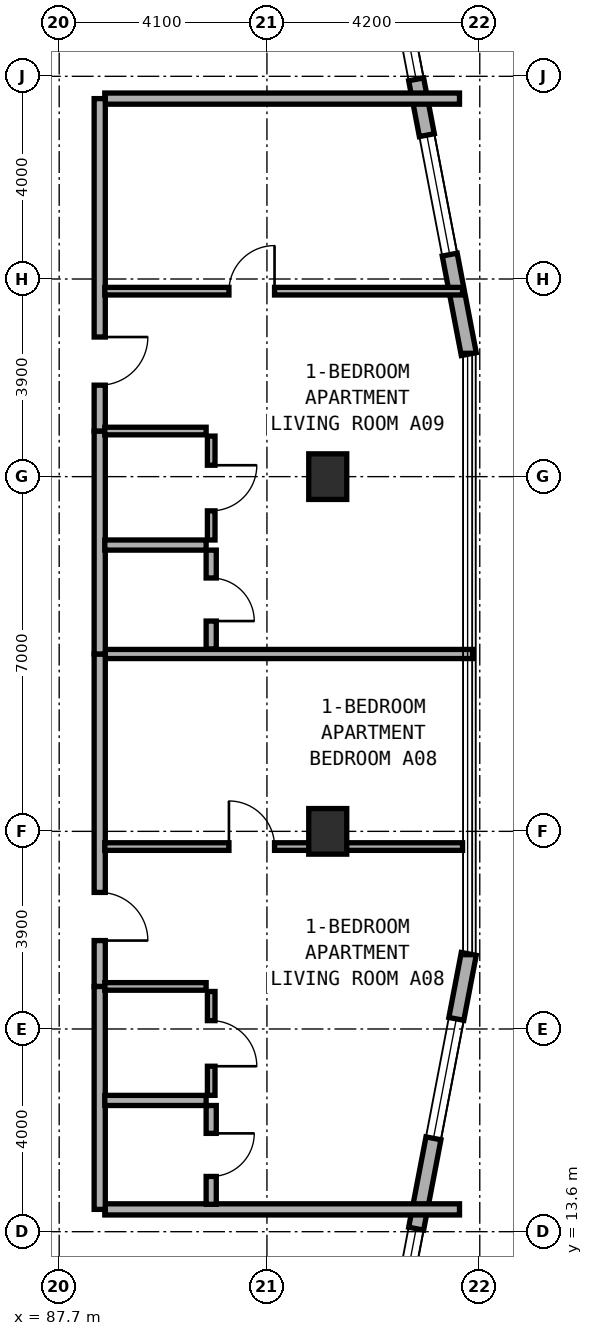
"""IFC4 building model, lengths in metres.
Left out: names, types, materials, properties, quantities, classifications, styles, units other than length and angle.
Written with IfcOpenShell. Run it as: python <this file> out.ifc"""

import sys

from ifc_helpers import new_model, si_unit, direction, frame, frame_2d, origin, origin_2d, place, context, subcontext, project, spatial, rectangle, extrude, element, fill, save


model = new_model("IFC4")
c1 = context("Model", 3, precision=1e-05, world=origin(), true_north=direction((0.0, 1.0)))
c2 = subcontext(c1, "Body", "Model", "MODEL_VIEW")
j1 = project(units=[si_unit("LENGTHUNIT", "METRE"), si_unit("PLANEANGLEUNIT", "RADIAN")], contexts=[c1])
p1 = place(None, origin())
s1 = spatial("IfcSite", under=j1, at=p1, CompositionType="ELEMENT")
p2 = place(p1, origin())
s2 = spatial("IfcBuilding", under=s1, at=p2, CompositionType="ELEMENT")
p3 = place(p2, frame((0.0, 0.0, 31.0)))
s3 = spatial("IfcBuildingStorey", under=s2, at=p3, CompositionType="ELEMENT", Elevation=31.0)
for number, where, z_axis, x_axis in (
    (1, (93.0, 21.5, 0.0), (0.0, 0.0, 1.0), (1.0, 0.0, 0.0)),
    (2, (93.0, 28.5, 0.0), (0.0, 0.0, 1.0), (1.0, 0.0, 0.0)),
):
    element("IfcColumn", number, at=place(p3, frame(where, z_axis=z_axis, x_axis=x_axis)), inside=s3, PredefinedType="COLUMN", context=c2, shape_type="SweptSolid", body=[
        extrude(rectangle(XDim=0.75, YDim=0.9, at=origin_2d()), origin(), (0.0, 0.0, 1.0), 3.5),
    ])
p4 = place(p3, frame((93.971, 9.62, 0.0), z_axis=(0.0, 0.0, 1.0), x_axis=(0.188087874316, 0.982152203854, 0.0)))
e3 = element("IfcWall", 3, at=p4, inside=s3, PredefinedType="STANDARD", context=c2, shape_type="SweptSolid", body=[
    extrude(rectangle(XDim=9.634, YDim=0.3, at=frame_2d((4.817, 0.0))), origin(), (0.0, 0.0, 1.0), 3.25),
])
p5 = place(p4, frame((0.452, 0.0, 0.85)))
e4 = element("IfcOpeningElement", 4, at=p5, cuts=e3, PredefinedType="OPENING", context=c2, shape_type="SweptSolid", body=[
    extrude(rectangle(XDim=1.5, YDim=1.5, at=frame_2d((0.75, 0.75))), frame((0.0, 0.16, 0.0), z_axis=(0.0, -1.0, 0.0), x_axis=(1.0, 0.0, 0.0)), (0.0, 0.0, 1.0), 0.32),
])
p6 = place(p4, frame((2.913, 0.0, 0.85)))
e5 = element("IfcOpeningElement", 5, at=p6, cuts=e3, PredefinedType="OPENING", context=c2, shape_type="SweptSolid", body=[
    extrude(rectangle(XDim=1.2, YDim=1.5, at=frame_2d((0.6, 0.75))), frame((0.0, 0.16, 0.0), z_axis=(0.0, -1.0, 0.0), x_axis=(1.0, 0.0, 0.0)), (0.0, 0.0, 1.0), 0.32),
])
p7 = place(p4, frame((5.928, 0.0, 0.8)))
e6 = element("IfcOpeningElement", 6, at=p7, cuts=e3, PredefinedType="OPENING", context=c2, shape_type="SweptSolid", body=[
    extrude(rectangle(XDim=2.4, YDim=1.6, at=frame_2d((1.2, 0.8))), frame((0.0, 0.16, 0.0), z_axis=(0.0, -1.0, 0.0), x_axis=(1.0, 0.0, 0.0)), (0.0, 0.0, 1.0), 0.32),
])
p8 = place(p3, frame((95.783, 30.918, 0.0), z_axis=(0.0, 0.0, 1.0), x_axis=(-0.188087874316, 0.982152203854, 0.0)))
e7 = element("IfcWall", 7, at=p8, inside=s3, PredefinedType="STANDARD", context=c2, shape_type="SweptSolid", body=[
    extrude(rectangle(XDim=9.634, YDim=0.3, at=frame_2d((4.817, 0.0))), origin(), (0.0, 0.0, 1.0), 3.25),
])
p9 = place(p8, frame((1.999, 0.0, 0.8)))
e8 = element("IfcOpeningElement", 8, at=p9, cuts=e7, PredefinedType="OPENING", context=c2, shape_type="SweptSolid", body=[
    extrude(rectangle(XDim=2.4, YDim=1.6, at=frame_2d((1.2, 0.8))), frame((0.0, 0.16, 0.0), z_axis=(0.0, -1.0, 0.0), x_axis=(1.0, 0.0, 0.0)), (0.0, 0.0, 1.0), 0.32),
])
p10 = place(p8, frame((5.521, 0.0, 0.85)))
e9 = element("IfcOpeningElement", 9, at=p10, cuts=e7, PredefinedType="OPENING", context=c2, shape_type="SweptSolid", body=[
    extrude(rectangle(XDim=1.2, YDim=1.5, at=frame_2d((0.6, 0.75))), frame((0.0, 0.16, 0.0), z_axis=(0.0, -1.0, 0.0), x_axis=(1.0, 0.0, 0.0)), (0.0, 0.0, 1.0), 0.32),
])
p11 = place(p8, frame((7.682, 0.0, 0.85)))
e10 = element("IfcOpeningElement", 10, at=p11, cuts=e7, PredefinedType="OPENING", context=c2, shape_type="SweptSolid", body=[
    extrude(rectangle(XDim=1.5, YDim=1.5, at=frame_2d((0.75, 0.75))), frame((0.0, 0.16, 0.0), z_axis=(0.0, -1.0, 0.0), x_axis=(1.0, 0.0, 0.0)), (0.0, 0.0, 1.0), 0.32),
])
for number, where, z_axis, x_axis in (
    (11, (88.6, 14.04, 0.0), (0.0, 0.0, 1.0), (1.0, 0.0, 0.0)),
    (12, (88.6, 35.96, 0.0), (0.0, 0.0, 1.0), (1.0, 0.0, 0.0)),
):
    element("IfcWall", number, at=place(p3, frame(where, z_axis=z_axis, x_axis=x_axis)), inside=s3, PredefinedType="SOLIDWALL", context=c2, shape_type="SweptSolid", body=[
        extrude(rectangle(XDim=7.0, YDim=0.22, at=frame_2d((3.5, 0.0))), origin(), (0.0, 0.0, 1.0), 2.865),
    ])
p12 = place(p3, frame((88.5, 25.0, 0.0), z_axis=(0.0, 0.0, 1.0), x_axis=(1.0, 0.0, 0.0)))
e13 = element("IfcWall", 13, at=p12, inside=s3, PredefinedType="SOLIDWALL", context=c2, shape_type="SweptSolid", body=[
    extrude(rectangle(XDim=7.36, YDim=0.18, at=frame_2d((3.68, 0.0))), origin(), (0.0, 0.0, 1.0), 2.865),
])
p13 = place(p3, frame((88.5, 14.04, 0.0), z_axis=(0.0, 0.0, 1.0), x_axis=(0.0, 1.0, 0.0)))
e14 = element("IfcWall", 14, at=p13, inside=s3, PredefinedType="SOLIDWALL", context=c2, shape_type="SweptSolid", body=[
    extrude(rectangle(XDim=4.4, YDim=0.22, at=frame_2d((2.2, 0.0))), origin(), (0.0, 0.0, 1.0), 3.22),
])
p14 = place(p3, frame((88.5, 18.44, 0.0), z_axis=(0.0, 0.0, 1.0), x_axis=(0.0, 1.0, 0.0)))
e15 = element("IfcWall", 15, at=p14, inside=s3, PredefinedType="SOLIDWALL", context=c2, shape_type="SweptSolid", body=[
    extrude(rectangle(XDim=6.56, YDim=0.22, at=frame_2d((3.28, 0.0))), origin(), (0.0, 0.0, 1.0), 2.725),
])
p15 = place(p14, frame((0.905, 0.0, 0.0)))
e16 = element("IfcOpeningElement", 16, at=p15, cuts=e15, PredefinedType="OPENING", context=c2, shape_type="SweptSolid", body=[
    extrude(rectangle(XDim=0.95, YDim=2.1, at=frame_2d((0.475, 1.05))), frame((0.0, 0.12, 0.0), z_axis=(0.0, -1.0, 0.0), x_axis=(1.0, 0.0, 0.0)), (0.0, 0.0, 1.0), 0.24),
])
p16 = place(p3, frame((88.6, 21.2, 0.0), z_axis=(0.0, 0.0, 1.0), x_axis=(1.0, 0.0, 0.0)))
e17 = element("IfcWall", 17, at=p16, inside=s3, PredefinedType="PARTITIONING", context=c2, shape_type="SweptSolid", body=[
    extrude(rectangle(XDim=7.06, YDim=0.15, at=frame_2d((3.53, 0.0))), origin(), (0.0, 0.0, 1.0), 2.865),
])
p17 = place(p16, frame((2.45, 0.0, 0.0)))
e18 = element("IfcOpeningElement", 18, at=p17, cuts=e17, PredefinedType="OPENING", context=c2, shape_type="SweptSolid", body=[
    extrude(rectangle(XDim=0.9, YDim=2.1, at=frame_2d((0.45, 1.05))), frame((0.0, 0.085, 0.0), z_axis=(0.0, -1.0, 0.0), x_axis=(1.0, 0.0, 0.0)), (0.0, 0.0, 1.0), 0.17),
])
p18 = place(p3, frame((88.6, 16.19, 0.0), z_axis=(0.0, 0.0, 1.0), x_axis=(1.0, 0.0, 0.0)))
e19 = element("IfcWall", 19, at=p18, inside=s3, PredefinedType="PLUMBINGWALL", context=c2, shape_type="SweptSolid", body=[
    extrude(rectangle(XDim=2.0, YDim=0.2, at=frame_2d((1.0, 0.0))), origin(), (0.0, 0.0, 1.0), 3.22),
])
p19 = place(p3, frame((88.6, 18.44, 0.0), z_axis=(0.0, 0.0, 1.0), x_axis=(1.0, 0.0, 0.0)))
e20 = element("IfcWall", 20, at=p19, inside=s3, PredefinedType="PARTITIONING", context=c2, shape_type="SweptSolid", body=[
    extrude(rectangle(XDim=2.0, YDim=0.15, at=frame_2d((1.0, 0.0))), origin(), (0.0, 0.0, 1.0), 3.22),
])
p20 = place(p3, frame((90.7, 14.14, 0.0), z_axis=(0.0, 0.0, 1.0), x_axis=(0.0, 1.0, 0.0)))
e21 = element("IfcWall", 21, at=p20, inside=s3, PredefinedType="PLUMBINGWALL", context=c2, shape_type="SweptSolid", body=[
    extrude(rectangle(XDim=1.95, YDim=0.2, at=frame_2d((0.975, 0.0))), origin(), (0.0, 0.0, 1.0), 3.22),
])
p21 = place(p20, frame((0.55, 0.0, 0.0)))
e22 = element("IfcOpeningElement", 22, at=p21, cuts=e21, PredefinedType="OPENING", context=c2, shape_type="SweptSolid", body=[
    extrude(rectangle(XDim=0.85, YDim=2.1, at=frame_2d((0.425, 1.05))), frame((0.0, 0.11, 0.0), z_axis=(0.0, -1.0, 0.0), x_axis=(1.0, 0.0, 0.0)), (0.0, 0.0, 1.0), 0.22),
])
p22 = place(p3, frame((90.7, 16.29, 0.0), z_axis=(0.0, 0.0, 1.0), x_axis=(0.0, 1.0, 0.0)))
e23 = element("IfcWall", 23, at=p22, inside=s3, PredefinedType="PARTITIONING", context=c2, shape_type="SweptSolid", body=[
    extrude(rectangle(XDim=2.05, YDim=0.15, at=frame_2d((1.025, 0.0))), origin(), (0.0, 0.0, 1.0), 3.22),
])
p23 = place(p22, frame((0.575, 0.0, 0.0)))
e24 = element("IfcOpeningElement", 24, at=p23, cuts=e23, PredefinedType="OPENING", context=c2, shape_type="SweptSolid", body=[
    extrude(rectangle(XDim=0.9, YDim=2.1, at=frame_2d((0.45, 1.05))), frame((0.0, 0.085, 0.0), z_axis=(0.0, -1.0, 0.0), x_axis=(1.0, 0.0, 0.0)), (0.0, 0.0, 1.0), 0.17),
])
p24 = place(p3, frame((88.5, 25.0, 0.0), z_axis=(0.0, 0.0, 1.0), x_axis=(0.0, 1.0, 0.0)))
e25 = element("IfcWall", 25, at=p24, inside=s3, PredefinedType="SOLIDWALL", context=c2, shape_type="SweptSolid", body=[
    extrude(rectangle(XDim=4.4, YDim=0.22, at=frame_2d((2.2, 0.0))), origin(), (0.0, 0.0, 1.0), 2.725),
])
p25 = place(p3, frame((88.5, 29.4, 0.0), z_axis=(0.0, 0.0, 1.0), x_axis=(0.0, 1.0, 0.0)))
e26 = element("IfcWall", 26, at=p25, inside=s3, PredefinedType="SOLIDWALL", context=c2, shape_type="SweptSolid", body=[
    extrude(rectangle(XDim=6.56, YDim=0.22, at=frame_2d((3.28, 0.0))), origin(), (0.0, 0.0, 1.0), 3.22),
])
p26 = place(p25, frame((0.905, 0.0, 0.0)))
e27 = element("IfcOpeningElement", 27, at=p26, cuts=e26, PredefinedType="OPENING", context=c2, shape_type="SweptSolid", body=[
    extrude(rectangle(XDim=0.95, YDim=2.1, at=frame_2d((0.475, 1.05))), frame((0.0, 0.12, 0.0), z_axis=(0.0, -1.0, 0.0), x_axis=(1.0, 0.0, 0.0)), (0.0, 0.0, 1.0), 0.24),
])
p27 = place(p3, frame((88.6, 32.16, 0.0), z_axis=(0.0, 0.0, 1.0), x_axis=(1.0, 0.0, 0.0)))
e28 = element("IfcWall", 28, at=p27, inside=s3, PredefinedType="PARTITIONING", context=c2, shape_type="SweptSolid", body=[
    extrude(rectangle(XDim=7.06, YDim=0.15, at=frame_2d((3.53, 0.0))), origin(), (0.0, 0.0, 1.0), 2.865),
])
p28 = place(p27, frame((2.45, 0.0, 0.0)))
e29 = element("IfcOpeningElement", 29, at=p28, cuts=e28, PredefinedType="OPENING", context=c2, shape_type="SweptSolid", body=[
    extrude(rectangle(XDim=0.9, YDim=2.1, at=frame_2d((0.45, 1.05))), frame((0.0, 0.085, 0.0), z_axis=(0.0, -1.0, 0.0), x_axis=(1.0, 0.0, 0.0)), (0.0, 0.0, 1.0), 0.17),
])
p29 = place(p3, frame((88.6, 27.15, 0.0), z_axis=(0.0, 0.0, 1.0), x_axis=(1.0, 0.0, 0.0)))
e30 = element("IfcWall", 30, at=p29, inside=s3, PredefinedType="PLUMBINGWALL", context=c2, shape_type="SweptSolid", body=[
    extrude(rectangle(XDim=2.0, YDim=0.2, at=frame_2d((1.0, 0.0))), origin(), (0.0, 0.0, 1.0), 3.22),
])
p30 = place(p3, frame((88.6, 29.4, 0.0), z_axis=(0.0, 0.0, 1.0), x_axis=(1.0, 0.0, 0.0)))
e31 = element("IfcWall", 31, at=p30, inside=s3, PredefinedType="PARTITIONING", context=c2, shape_type="SweptSolid", body=[
    extrude(rectangle(XDim=2.0, YDim=0.15, at=frame_2d((1.0, 0.0))), origin(), (0.0, 0.0, 1.0), 3.22),
])
p31 = place(p3, frame((90.7, 25.1, 0.0), z_axis=(0.0, 0.0, 1.0), x_axis=(0.0, 1.0, 0.0)))
e32 = element("IfcWall", 32, at=p31, inside=s3, PredefinedType="PLUMBINGWALL", context=c2, shape_type="SweptSolid", body=[
    extrude(rectangle(XDim=1.95, YDim=0.2, at=frame_2d((0.975, 0.0))), origin(), (0.0, 0.0, 1.0), 3.22),
])
p32 = place(p31, frame((0.55, 0.0, 0.0)))
e33 = element("IfcOpeningElement", 33, at=p32, cuts=e32, PredefinedType="OPENING", context=c2, shape_type="SweptSolid", body=[
    extrude(rectangle(XDim=0.85, YDim=2.1, at=frame_2d((0.425, 1.05))), frame((0.0, 0.11, 0.0), z_axis=(0.0, -1.0, 0.0), x_axis=(1.0, 0.0, 0.0)), (0.0, 0.0, 1.0), 0.22),
])
p33 = place(p3, frame((90.7, 27.25, 0.0), z_axis=(0.0, 0.0, 1.0), x_axis=(0.0, 1.0, 0.0)))
e34 = element("IfcWall", 34, at=p33, inside=s3, PredefinedType="PARTITIONING", context=c2, shape_type="SweptSolid", body=[
    extrude(rectangle(XDim=2.05, YDim=0.15, at=frame_2d((1.025, 0.0))), origin(), (0.0, 0.0, 1.0), 2.725),
])
p34 = place(p33, frame((0.575, 0.0, 0.0)))
e35 = element("IfcOpeningElement", 35, at=p34, cuts=e34, PredefinedType="OPENING", context=c2, shape_type="SweptSolid", body=[
    extrude(rectangle(XDim=0.9, YDim=2.1, at=frame_2d((0.45, 1.05))), frame((0.0, 0.085, 0.0), z_axis=(0.0, -1.0, 0.0), x_axis=(1.0, 0.0, 0.0)), (0.0, 0.0, 1.0), 0.17),
])
p35 = place(p6, origin())
e36 = element("IfcWindow", 36, at=p35, inside=s3, PartitioningType="SINGLE_PANEL", PredefinedType="WINDOW", context=c2, shape_type="SweptSolid", body=[
    extrude(rectangle(XDim=1.2, YDim=1.5, at=frame_2d((0.6, 0.75))), frame((0.0, 0.03, 0.0), z_axis=(0.0, -1.0, 0.0), x_axis=(1.0, 0.0, 0.0)), (0.0, 0.0, 1.0), 0.06),
])
fill(e5, e36)
p36 = place(p7, origin())
e37 = element("IfcWindow", 37, at=p36, inside=s3, PartitioningType="SINGLE_PANEL", PredefinedType="WINDOW", context=c2, shape_type="SweptSolid", body=[
    extrude(rectangle(XDim=2.4, YDim=1.6, at=frame_2d((1.2, 0.8))), frame((0.0, 0.03, 0.0), z_axis=(0.0, -1.0, 0.0), x_axis=(1.0, 0.0, 0.0)), (0.0, 0.0, 1.0), 0.06),
])
fill(e6, e37)
p37 = place(p9, origin())
e38 = element("IfcWindow", 38, at=p37, inside=s3, PartitioningType="SINGLE_PANEL", PredefinedType="WINDOW", context=c2, shape_type="SweptSolid", body=[
    extrude(rectangle(XDim=2.4, YDim=1.6, at=frame_2d((1.2, 0.8))), frame((0.0, 0.03, 0.0), z_axis=(0.0, -1.0, 0.0), x_axis=(1.0, 0.0, 0.0)), (0.0, 0.0, 1.0), 0.06),
])
fill(e8, e38)
p38 = place(p10, origin())
e39 = element("IfcWindow", 39, at=p38, inside=s3, PartitioningType="SINGLE_PANEL", PredefinedType="WINDOW", context=c2, shape_type="SweptSolid", body=[
    extrude(rectangle(XDim=1.2, YDim=1.5, at=frame_2d((0.6, 0.75))), frame((0.0, 0.03, 0.0), z_axis=(0.0, -1.0, 0.0), x_axis=(1.0, 0.0, 0.0)), (0.0, 0.0, 1.0), 0.06),
])
fill(e9, e39)
p39 = place(p15, frame((0.95, 0.0, 0.0), z_axis=(0.0, 0.0, 1.0), x_axis=(-1.0, 0.0, 0.0)))
e40 = element("IfcDoor", 40, at=p39, inside=s3, OperationType="SINGLE_SWING_RIGHT", PredefinedType="DOOR", context=c2, shape_type="SweptSolid", body=[
    extrude(rectangle(XDim=0.95, YDim=2.1, at=frame_2d((0.475, 1.05))), frame((0.0, 0.025, 0.0), z_axis=(0.0, -1.0, 0.0), x_axis=(1.0, 0.0, 0.0)), (0.0, 0.0, 1.0), 0.05),
])
fill(e16, e40)
p40 = place(p17, origin())
e41 = element("IfcDoor", 41, at=p40, inside=s3, OperationType="SINGLE_SWING_LEFT", PredefinedType="DOOR", context=c2, shape_type="SweptSolid", body=[
    extrude(rectangle(XDim=0.9, YDim=2.1, at=frame_2d((0.45, 1.05))), frame((0.0, 0.025, 0.0), z_axis=(0.0, -1.0, 0.0), x_axis=(1.0, 0.0, 0.0)), (0.0, 0.0, 1.0), 0.05),
])
fill(e18, e41)
p41 = place(p21, frame((0.85, 0.0, 0.0), z_axis=(0.0, 0.0, 1.0), x_axis=(-1.0, 0.0, 0.0)))
e42 = element("IfcDoor", 42, at=p41, inside=s3, OperationType="SINGLE_SWING_LEFT", PredefinedType="DOOR", context=c2, shape_type="SweptSolid", body=[
    extrude(rectangle(XDim=0.85, YDim=2.1, at=frame_2d((0.425, 1.05))), frame((0.0, 0.025, 0.0), z_axis=(0.0, -1.0, 0.0), x_axis=(1.0, 0.0, 0.0)), (0.0, 0.0, 1.0), 0.05),
])
fill(e22, e42)
p42 = place(p23, frame((0.9, 0.0, 0.0), z_axis=(0.0, 0.0, 1.0), x_axis=(-1.0, 0.0, 0.0)))
e43 = element("IfcDoor", 43, at=p42, inside=s3, OperationType="SINGLE_SWING_RIGHT", PredefinedType="DOOR", context=c2, shape_type="SweptSolid", body=[
    extrude(rectangle(XDim=0.9, YDim=2.1, at=frame_2d((0.45, 1.05))), frame((0.0, 0.025, 0.0), z_axis=(0.0, -1.0, 0.0), x_axis=(1.0, 0.0, 0.0)), (0.0, 0.0, 1.0), 0.05),
])
fill(e24, e43)
p43 = place(p26, frame((0.95, 0.0, 0.0), z_axis=(0.0, 0.0, 1.0), x_axis=(-1.0, 0.0, 0.0)))
e44 = element("IfcDoor", 44, at=p43, inside=s3, OperationType="SINGLE_SWING_LEFT", PredefinedType="DOOR", context=c2, shape_type="SweptSolid", body=[
    extrude(rectangle(XDim=0.95, YDim=2.1, at=frame_2d((0.475, 1.05))), frame((0.0, 0.025, 0.0), z_axis=(0.0, -1.0, 0.0), x_axis=(1.0, 0.0, 0.0)), (0.0, 0.0, 1.0), 0.05),
])
fill(e27, e44)
p44 = place(p28, origin())
e45 = element("IfcDoor", 45, at=p44, inside=s3, OperationType="SINGLE_SWING_RIGHT", PredefinedType="DOOR", context=c2, shape_type="SweptSolid", body=[
    extrude(rectangle(XDim=0.9, YDim=2.1, at=frame_2d((0.45, 1.05))), frame((0.0, 0.025, 0.0), z_axis=(0.0, -1.0, 0.0), x_axis=(1.0, 0.0, 0.0)), (0.0, 0.0, 1.0), 0.05),
])
fill(e29, e45)
p45 = place(p32, frame((0.85, 0.0, 0.0), z_axis=(0.0, 0.0, 1.0), x_axis=(-1.0, 0.0, 0.0)))
e46 = element("IfcDoor", 46, at=p45, inside=s3, OperationType="SINGLE_SWING_RIGHT", PredefinedType="DOOR", context=c2, shape_type="SweptSolid", body=[
    extrude(rectangle(XDim=0.85, YDim=2.1, at=frame_2d((0.425, 1.05))), frame((0.0, 0.025, 0.0), z_axis=(0.0, -1.0, 0.0), x_axis=(1.0, 0.0, 0.0)), (0.0, 0.0, 1.0), 0.05),
])
fill(e33, e46)
p46 = place(p34, frame((0.9, 0.0, 0.0), z_axis=(0.0, 0.0, 1.0), x_axis=(-1.0, 0.0, 0.0)))
e47 = element("IfcDoor", 47, at=p46, inside=s3, OperationType="SINGLE_SWING_LEFT", PredefinedType="DOOR", context=c2, shape_type="SweptSolid", body=[
    extrude(rectangle(XDim=0.9, YDim=2.1, at=frame_2d((0.45, 1.05))), frame((0.0, 0.025, 0.0), z_axis=(0.0, -1.0, 0.0), x_axis=(1.0, 0.0, 0.0)), (0.0, 0.0, 1.0), 0.05),
])
fill(e35, e47)
save(model, sys.argv[1])
